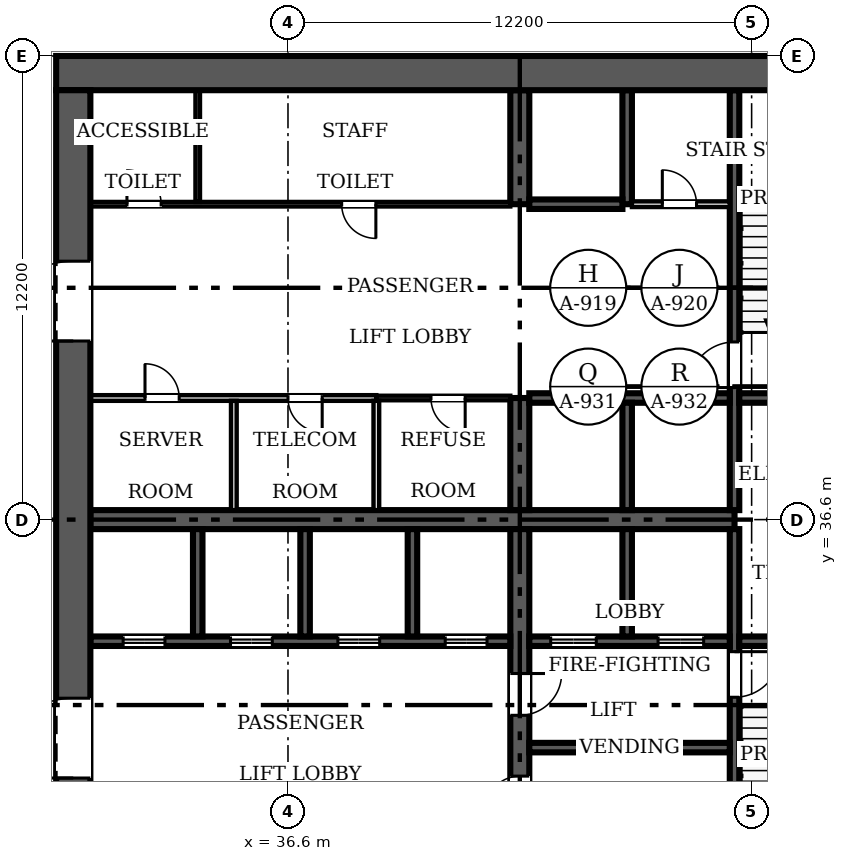
"""IFC4 building model, lengths in metres.
Left out: names, types, materials, properties, quantities, classifications, styles, units other than length and angle.
Written with IfcOpenShell. Run it as: python <this file> out.ifc"""

import sys

from ifc_helpers import new_model, si_unit, direction, frame, frame_2d, origin, place, context, subcontext, project, spatial, rectangle, extrude, source, transform, mapped, element, fill, save


model = new_model("IFC4")
c1 = context("Model", 3, precision=1e-05, world=origin(), true_north=direction((0.0, 1.0)))
c2 = subcontext(c1, "Body", "Model", "MODEL_VIEW")
j1 = project(units=[si_unit("LENGTHUNIT", "METRE"), si_unit("PLANEANGLEUNIT", "RADIAN")], contexts=[c1])
p1 = place(None, origin())
s1 = spatial("IfcSite", under=j1, at=p1, CompositionType="ELEMENT")
p2 = place(p1, origin())
s2 = spatial("IfcBuilding", under=s1, at=p2, CompositionType="ELEMENT")
p3 = place(p2, frame((0.0, 0.0, 7.2)))
s3 = spatial("IfcBuildingStorey", under=s2, at=p3, CompositionType="ELEMENT", Elevation=7.2)
p4 = place(p3, frame((30.95, 25.3, 0.0), z_axis=(0.0, 0.0, 1.0), x_axis=(0.0, 1.0, 0.0)))
e1 = element("IfcWall", 1, at=p4, inside=s3, PredefinedType="SHEAR", context=c2, shape_type="SweptSolid", body=[
    extrude(rectangle(XDim=22.6, YDim=0.9, at=frame_2d((11.3, 0.0))), origin(), (0.0, 0.0, 1.0), 4.8),
])
m1 = source(origin(), c2, "Body", "SweptSolid", [
    extrude(rectangle(XDim=2.1, YDim=2.4, at=frame_2d((1.05, 1.2))), frame((0.0, 0.46, 0.0), z_axis=(0.0, -1.0, 0.0), x_axis=(1.0, 0.0, 0.0)), (0.0, 0.0, 1.0), 0.92),
])
p5 = place(p4, frame((4.5, 0.0, 0.0)))
e2 = element("IfcOpeningElement", 2, at=p5, cuts=e1, PredefinedType="OPENING", context=c2, shape_type="MappedRepresentation", body=[
    mapped(m1, transform((0.0, 0.0, 0.0), scale=1.0)),
])
p6 = place(p4, frame((16.0, 0.0, 0.0)))
e3 = element("IfcOpeningElement", 3, at=p6, cuts=e1, PredefinedType="OPENING", context=c2, shape_type="MappedRepresentation", body=[
    mapped(m1, transform((0.0, 0.0, 0.0), scale=1.0)),
])
p7 = place(p3, frame((30.5, 48.35, 0.0), z_axis=(0.0, 0.0, 1.0), x_axis=(1.0, 0.0, 0.0)))
e4 = element("IfcWall", 4, at=p7, inside=s3, PredefinedType="SHEAR", context=c2, shape_type="SweptSolid", body=[
    extrude(rectangle(XDim=24.4, YDim=0.9, at=frame_2d((12.2, 0.0))), origin(), (0.0, 0.0, 1.0), 4.8),
])
p8 = place(p3, frame((31.4, 36.6, 0.0), z_axis=(0.0, 0.0, 1.0), x_axis=(1.0, 0.0, 0.0)))
e5 = element("IfcWall", 5, at=p8, inside=s3, PredefinedType="SHEAR", context=c2, shape_type="SweptSolid", body=[
    extrude(rectangle(XDim=16.95, YDim=0.5, at=frame_2d((8.475, 0.0))), origin(), (0.0, 0.0, 1.0), 4.8),
])
p9 = place(p3, frame((42.7, 36.35, 0.0), z_axis=(0.0, 0.0, 1.0), x_axis=(0.0, -1.0, 0.0)))
e6 = element("IfcWall", 6, at=p9, inside=s3, PredefinedType="SHEAR", context=c2, shape_type="SweptSolid", body=[
    extrude(rectangle(XDim=11.05, YDim=0.5, at=frame_2d((5.525, 0.0))), origin(), (0.0, 0.0, 1.0), 4.8),
])
m2 = source(origin(), c2, "Body", "SweptSolid", [
    extrude(rectangle(XDim=0.9, YDim=2.1, at=frame_2d((0.45, 1.05))), frame((0.0, 0.26, 0.0), z_axis=(0.0, -1.0, 0.0), x_axis=(1.0, 0.0, 0.0)), (0.0, 0.0, 1.0), 0.52),
])
p10 = place(p9, frame((6.5, 0.0, 0.0)))
e7 = element("IfcOpeningElement", 7, at=p10, cuts=e6, PredefinedType="OPENING", context=c2, shape_type="MappedRepresentation", body=[
    mapped(m2, transform((0.0, 0.0, 0.0), scale=1.0)),
])
m3 = source(origin(), c2, "Body", "SweptSolid", [
    extrude(rectangle(XDim=1.1, YDim=2.1, at=frame_2d((0.55, 1.05))), frame((0.0, 0.26, 0.0), z_axis=(0.0, -1.0, 0.0), x_axis=(1.0, 0.0, 0.0)), (0.0, 0.0, 1.0), 0.52),
])
p11 = place(p9, frame((3.8, 0.0, 0.0)))
e8 = element("IfcOpeningElement", 8, at=p11, cuts=e6, PredefinedType="OPENING", context=c2, shape_type="MappedRepresentation", body=[
    mapped(m3, transform((0.0, 0.0, 0.0), scale=1.0)),
])
p12 = place(p3, frame((42.7, 36.85, 0.0), z_axis=(0.0, 0.0, 1.0), x_axis=(0.0, 1.0, 0.0)))
e9 = element("IfcWall", 9, at=p12, inside=s3, PredefinedType="SHEAR", context=c2, shape_type="SweptSolid", body=[
    extrude(rectangle(XDim=2.95, YDim=0.5, at=frame_2d((1.475, 0.0))), origin(), (0.0, 0.0, 1.0), 4.8),
])
p13 = place(p3, frame((42.7, 44.9, 0.0), z_axis=(0.0, 0.0, 1.0), x_axis=(0.0, 1.0, 0.0)))
e10 = element("IfcWall", 10, at=p13, inside=s3, PredefinedType="SHEAR", context=c2, shape_type="SweptSolid", body=[
    extrude(rectangle(XDim=3.0, YDim=0.5, at=frame_2d((1.5, 0.0))), origin(), (0.0, 0.0, 1.0), 4.8),
])
p14 = place(p3, frame((48.35, 36.35, 0.0), z_axis=(0.0, 0.0, 1.0), x_axis=(0.0, -1.0, 0.0)))
e11 = element("IfcWall", 11, at=p14, inside=s3, PredefinedType="SOLIDWALL", context=c2, shape_type="SweptSolid", body=[
    extrude(rectangle(XDim=11.05, YDim=0.25, at=frame_2d((5.525, 0.0))), origin(), (0.0, 0.0, 1.0), 4.8),
])
m4 = source(origin(), c2, "Body", "SweptSolid", [
    extrude(rectangle(XDim=1.2, YDim=2.1, at=frame_2d((0.6, 1.05))), frame((0.0, 0.135, 0.0), z_axis=(0.0, -1.0, 0.0), x_axis=(1.0, 0.0, 0.0)), (0.0, 0.0, 1.0), 0.27),
])
p15 = place(p14, frame((3.225, 0.0, 0.0)))
e12 = element("IfcOpeningElement", 12, at=p15, cuts=e11, PredefinedType="OPENING", context=c2, shape_type="MappedRepresentation", body=[
    mapped(m4, transform((0.0, 0.0, 0.0), scale=1.0)),
])
p16 = place(p3, frame((48.35, 47.9, 0.0), z_axis=(0.0, 0.0, 1.0), x_axis=(0.0, -1.0, 0.0)))
e13 = element("IfcWall", 13, at=p16, inside=s3, PredefinedType="SOLIDWALL", context=c2, shape_type="SweptSolid", body=[
    extrude(rectangle(XDim=11.05, YDim=0.25, at=frame_2d((5.525, 0.0))), origin(), (0.0, 0.0, 1.0), 4.8),
])
p17 = place(p16, frame((6.625, 0.0, 0.0)))
e14 = element("IfcOpeningElement", 14, at=p17, cuts=e13, PredefinedType="OPENING", context=c2, shape_type="MappedRepresentation", body=[
    mapped(m4, transform((0.0, 0.0, 0.0), scale=1.0)),
])
p18 = place(p3, frame((42.45, 33.4, 0.0), z_axis=(0.0, 0.0, 1.0), x_axis=(-1.0, 0.0, 0.0)))
e15 = element("IfcWall", 15, at=p18, inside=s3, PredefinedType="SOLIDWALL", context=c2, shape_type="SweptSolid", body=[
    extrude(rectangle(XDim=11.05, YDim=0.25, at=frame_2d((5.525, 0.0))), origin(), (0.0, 0.0, 1.0), 4.8),
])
m5 = source(origin(), c2, "Body", "SweptSolid", [
    extrude(rectangle(XDim=1.1, YDim=2.1, at=frame_2d((0.55, 1.05))), frame((0.0, 0.135, 0.0), z_axis=(0.0, -1.0, 0.0), x_axis=(1.0, 0.0, 0.0)), (0.0, 0.0, 1.0), 0.27),
])
p19 = place(p18, frame((9.087, 0.0, 0.0)))
e16 = element("IfcOpeningElement", 16, at=p19, cuts=e15, PredefinedType="OPENING", context=c2, shape_type="MappedRepresentation", body=[
    mapped(m5, transform((0.0, 0.0, 0.0), scale=1.0)),
])
p20 = place(p18, frame((6.262, 0.0, 0.0)))
e17 = element("IfcOpeningElement", 17, at=p20, cuts=e15, PredefinedType="OPENING", context=c2, shape_type="MappedRepresentation", body=[
    mapped(m5, transform((0.0, 0.0, 0.0), scale=1.0)),
])
p21 = place(p18, frame((3.438, 0.0, 0.0)))
e18 = element("IfcOpeningElement", 18, at=p21, cuts=e15, PredefinedType="OPENING", context=c2, shape_type="MappedRepresentation", body=[
    mapped(m5, transform((0.0, 0.0, 0.0), scale=1.0)),
])
p22 = place(p18, frame((0.613, 0.0, 0.0)))
e19 = element("IfcOpeningElement", 19, at=p22, cuts=e15, PredefinedType="OPENING", context=c2, shape_type="MappedRepresentation", body=[
    mapped(m5, transform((0.0, 0.0, 0.0), scale=1.0)),
])
p23 = place(p3, frame((48.225, 33.4, 0.0), z_axis=(0.0, 0.0, 1.0), x_axis=(-1.0, 0.0, 0.0)))
e20 = element("IfcWall", 20, at=p23, inside=s3, PredefinedType="SOLIDWALL", context=c2, shape_type="SweptSolid", body=[
    extrude(rectangle(XDim=5.275, YDim=0.25, at=frame_2d((2.638, 0.0))), origin(), (0.0, 0.0, 1.0), 4.8),
])
p24 = place(p23, frame((3.512, 0.0, 0.0)))
e21 = element("IfcOpeningElement", 21, at=p24, cuts=e20, PredefinedType="OPENING", context=c2, shape_type="MappedRepresentation", body=[
    mapped(m4, transform((0.0, 0.0, 0.0), scale=1.0)),
])
p25 = place(p23, frame((0.688, 0.0, 0.0)))
e22 = element("IfcOpeningElement", 22, at=p25, cuts=e20, PredefinedType="OPENING", context=c2, shape_type="MappedRepresentation", body=[
    mapped(m4, transform((0.0, 0.0, 0.0), scale=1.0)),
])
p26 = place(p3, frame((48.475, 33.4, 0.0), z_axis=(0.0, 0.0, 1.0), x_axis=(1.0, 0.0, 0.0)))
e23 = element("IfcWall", 23, at=p26, inside=s3, PredefinedType="SOLIDWALL", context=c2, shape_type="SweptSolid", body=[
    extrude(rectangle(XDim=3.525, YDim=0.25, at=frame_2d((1.762, 0.0))), origin(), (0.0, 0.0, 1.0), 4.8),
])
p27 = place(p3, frame((42.95, 39.8, 0.0), z_axis=(0.0, 0.0, 1.0), x_axis=(1.0, 0.0, 0.0)))
e24 = element("IfcWall", 24, at=p27, inside=s3, PredefinedType="SOLIDWALL", context=c2, shape_type="SweptSolid", body=[
    extrude(rectangle(XDim=5.275, YDim=0.25, at=frame_2d((2.638, 0.0))), origin(), (0.0, 0.0, 1.0), 4.8),
])
p28 = place(p3, frame((48.475, 39.8, 0.0), z_axis=(0.0, 0.0, 1.0), x_axis=(1.0, 0.0, 0.0)))
e25 = element("IfcWall", 25, at=p28, inside=s3, PredefinedType="SOLIDWALL", context=c2, shape_type="SweptSolid", body=[
    extrude(rectangle(XDim=3.525, YDim=0.25, at=frame_2d((1.762, 0.0))), origin(), (0.0, 0.0, 1.0), 4.8),
])
p29 = place(p3, frame((45.525, 33.525, 0.0), z_axis=(0.0, 0.0, 1.0), x_axis=(0.0, 1.0, 0.0)))
e26 = element("IfcWall", 26, at=p29, inside=s3, PredefinedType="SOLIDWALL", context=c2, shape_type="SweptSolid", body=[
    extrude(rectangle(XDim=2.825, YDim=0.25, at=frame_2d((1.413, 0.0))), origin(), (0.0, 0.0, 1.0), 4.8),
])
p30 = place(p3, frame((45.525, 36.85, 0.0), z_axis=(0.0, 0.0, 1.0), x_axis=(0.0, 1.0, 0.0)))
e27 = element("IfcWall", 27, at=p30, inside=s3, PredefinedType="SOLIDWALL", context=c2, shape_type="SweptSolid", body=[
    extrude(rectangle(XDim=2.825, YDim=0.25, at=frame_2d((1.413, 0.0))), origin(), (0.0, 0.0, 1.0), 4.8),
])
p31 = place(p3, frame((42.95, 30.6, 0.0), z_axis=(0.0, 0.0, 1.0), x_axis=(1.0, 0.0, 0.0)))
e28 = element("IfcWall", 28, at=p31, inside=s3, PredefinedType="SOLIDWALL", context=c2, shape_type="SweptSolid", body=[
    extrude(rectangle(XDim=5.275, YDim=0.25, at=frame_2d((2.638, 0.0))), origin(), (0.0, 0.0, 1.0), 4.8),
])
for number, where, z_axis, x_axis in (
    (29, (34.225, 33.525, 0.0), (0.0, 0.0, 1.0), (0.0, 1.0, 0.0)),
    (30, (37.05, 33.525, 0.0), (0.0, 0.0, 1.0), (0.0, 1.0, 0.0)),
    (31, (39.875, 33.525, 0.0), (0.0, 0.0, 1.0), (0.0, 1.0, 0.0)),
):
    element("IfcWall", number, at=place(p3, frame(where, z_axis=z_axis, x_axis=x_axis)), inside=s3, PredefinedType="SOLIDWALL", context=c2, shape_type="SweptSolid", body=[
        extrude(rectangle(XDim=2.825, YDim=0.25, at=frame_2d((1.413, 0.0))), origin(), (0.0, 0.0, 1.0), 4.8),
    ])
p32 = place(p3, frame((45.525, 44.9, 0.0), z_axis=(0.0, 0.0, 1.0), x_axis=(0.0, 1.0, 0.0)))
e32 = element("IfcWall", 32, at=p32, inside=s3, PredefinedType="SOLIDWALL", context=c2, shape_type="SweptSolid", body=[
    extrude(rectangle(XDim=3.0, YDim=0.25, at=frame_2d((1.5, 0.0))), origin(), (0.0, 0.0, 1.0), 4.8),
])
p33 = place(p3, frame((42.95, 44.9, 0.0), z_axis=(0.0, 0.0, 1.0), x_axis=(1.0, 0.0, 0.0)))
e33 = element("IfcWall", 33, at=p33, inside=s3, PredefinedType="SOLIDWALL", context=c2, shape_type="SweptSolid", body=[
    extrude(rectangle(XDim=2.45, YDim=0.25, at=frame_2d((1.225, 0.0))), origin(), (0.0, 0.0, 1.0), 4.8),
])
p34 = place(p3, frame((31.4, 44.9, 0.0), z_axis=(0.0, 0.0, 1.0), x_axis=(1.0, 0.0, 0.0)))
e34 = element("IfcWall", 34, at=p34, inside=s3, PredefinedType="PARTITIONING", context=c2, shape_type="SweptSolid", body=[
    extrude(rectangle(XDim=11.05, YDim=0.12, at=frame_2d((5.525, 0.0))), origin(), (0.0, 0.0, 1.0), 4.55),
])
m6 = source(origin(), c2, "Body", "SweptSolid", [
    extrude(rectangle(XDim=0.9, YDim=2.1, at=frame_2d((0.45, 1.05))), frame((0.0, 0.07, 0.0), z_axis=(0.0, -1.0, 0.0), x_axis=(1.0, 0.0, 0.0)), (0.0, 0.0, 1.0), 0.14),
])
p35 = place(p34, frame((0.962, 0.0, 0.0)))
e35 = element("IfcOpeningElement", 35, at=p35, cuts=e34, PredefinedType="OPENING", context=c2, shape_type="MappedRepresentation", body=[
    mapped(m6, transform((0.0, 0.0, 0.0), scale=1.0)),
])
p36 = place(p34, frame((6.613, 0.0, 0.0)))
e36 = element("IfcOpeningElement", 36, at=p36, cuts=e34, PredefinedType="OPENING", context=c2, shape_type="MappedRepresentation", body=[
    mapped(m6, transform((0.0, 0.0, 0.0), scale=1.0)),
])
p37 = place(p3, frame((38.925, 39.8, 0.0), z_axis=(0.0, 0.0, 1.0), x_axis=(-1.0, 0.0, 0.0)))
e37 = element("IfcWall", 37, at=p37, inside=s3, PredefinedType="PARTITIONING", context=c2, shape_type="SweptSolid", body=[
    extrude(rectangle(XDim=7.525, YDim=0.15, at=frame_2d((3.763, 0.0))), origin(), (0.0, 0.0, 1.0), 4.55),
])
m7 = source(origin(), c2, "Body", "SweptSolid", [
    extrude(rectangle(XDim=0.9, YDim=2.1, at=frame_2d((0.45, 1.05))), frame((0.0, 0.085, 0.0), z_axis=(0.0, -1.0, 0.0), x_axis=(1.0, 0.0, 0.0)), (0.0, 0.0, 1.0), 0.17),
])
p38 = place(p37, frame((5.188, 0.0, 0.0)))
e38 = element("IfcOpeningElement", 38, at=p38, cuts=e37, PredefinedType="OPENING", context=c2, shape_type="MappedRepresentation", body=[
    mapped(m7, transform((0.0, 0.0, 0.0), scale=1.0)),
])
p39 = place(p37, frame((1.425, 0.0, 0.0)))
e39 = element("IfcOpeningElement", 39, at=p39, cuts=e37, PredefinedType="OPENING", context=c2, shape_type="MappedRepresentation", body=[
    mapped(m7, transform((0.0, 0.0, 0.0), scale=1.0)),
])
p40 = place(p3, frame((42.45, 39.8, 0.0), z_axis=(0.0, 0.0, 1.0), x_axis=(-1.0, 0.0, 0.0)))
e40 = element("IfcWall", 40, at=p40, inside=s3, PredefinedType="PARTITIONING", context=c2, shape_type="SweptSolid", body=[
    extrude(rectangle(XDim=3.525, YDim=0.12, at=frame_2d((1.762, 0.0))), origin(), (0.0, 0.0, 1.0), 4.55),
])
p41 = place(p40, frame((1.188, 0.0, 0.0)))
e41 = element("IfcOpeningElement", 41, at=p41, cuts=e40, PredefinedType="OPENING", context=c2, shape_type="MappedRepresentation", body=[
    mapped(m6, transform((0.0, 0.0, 0.0), scale=1.0)),
])
for number, where, z_axis, x_axis in (
    (42, (35.175, 36.85, 0.0), (0.0, 0.0, 1.0), (0.0, 1.0, 0.0)),
    (43, (38.925, 36.85, 0.0), (0.0, 0.0, 1.0), (0.0, 1.0, 0.0)),
):
    element("IfcWall", number, at=place(p3, frame(where, z_axis=z_axis, x_axis=x_axis)), inside=s3, PredefinedType="PARTITIONING", context=c2, shape_type="SweptSolid", body=[
        extrude(rectangle(XDim=2.875, YDim=0.15, at=frame_2d((1.438, 0.0))), origin(), (0.0, 0.0, 1.0), 4.55),
    ])
p42 = place(p3, frame((34.225, 44.96, 0.0), z_axis=(0.0, 0.0, 1.0), x_axis=(0.0, 1.0, 0.0)))
e44 = element("IfcWall", 44, at=p42, inside=s3, PredefinedType="PARTITIONING", context=c2, shape_type="SweptSolid", body=[
    extrude(rectangle(XDim=2.94, YDim=0.12, at=frame_2d((1.47, 0.0))), origin(), (0.0, 0.0, 1.0), 4.55),
])
p43 = place(p3, frame((45.65, 44.9, 0.0), z_axis=(0.0, 0.0, 1.0), x_axis=(1.0, 0.0, 0.0)))
e45 = element("IfcWall", 45, at=p43, inside=s3, PredefinedType="PARTITIONING", context=c2, shape_type="SweptSolid", body=[
    extrude(rectangle(XDim=2.575, YDim=0.15, at=frame_2d((1.288, 0.0))), origin(), (0.0, 0.0, 1.0), 4.55),
])
p44 = place(p43, frame((0.8, 0.0, 0.0)))
e46 = element("IfcOpeningElement", 46, at=p44, cuts=e45, PredefinedType="OPENING", context=c2, shape_type="MappedRepresentation", body=[
    mapped(m7, transform((0.0, 0.0, 0.0), scale=1.0)),
])
m8 = source(origin(), c2, "Body", "SweptSolid", [
    extrude(rectangle(XDim=2.1, YDim=2.4, at=frame_2d((1.05, 1.2))), frame((0.0, 0.025, 0.0), z_axis=(0.0, -1.0, 0.0), x_axis=(1.0, 0.0, 0.0)), (0.0, 0.0, 1.0), 0.05),
])
p45 = place(p5, origin())
e47 = element("IfcDoor", 47, at=p45, inside=s3, OperationType="DOUBLE_DOOR_SINGLE_SWING", PredefinedType="DOOR", context=c2, shape_type="MappedRepresentation", body=[
    mapped(m8, transform((0.0, 0.0, 0.0), scale=1.0)),
])
fill(e2, e47)
p46 = place(p6, origin())
e48 = element("IfcDoor", 48, at=p46, inside=s3, OperationType="DOUBLE_DOOR_SINGLE_SWING", PredefinedType="DOOR", context=c2, shape_type="MappedRepresentation", body=[
    mapped(m8, transform((0.0, 0.0, 0.0), scale=1.0)),
])
fill(e3, e48)
m9 = source(origin(), c2, "Body", "SweptSolid", [
    extrude(rectangle(XDim=0.9, YDim=2.1, at=frame_2d((0.45, 1.05))), frame((0.0, 0.025, 0.0), z_axis=(0.0, -1.0, 0.0), x_axis=(1.0, 0.0, 0.0)), (0.0, 0.0, 1.0), 0.05),
])
p47 = place(p10, origin())
e49 = element("IfcDoor", 49, at=p47, inside=s3, OperationType="SINGLE_SWING_RIGHT", PredefinedType="DOOR", context=c2, shape_type="MappedRepresentation", body=[
    mapped(m9, transform((0.0, 0.0, 0.0), scale=1.0)),
])
fill(e7, e49)
m10 = source(origin(), c2, "Body", "SweptSolid", [
    extrude(rectangle(XDim=1.1, YDim=2.1, at=frame_2d((0.55, 1.05))), frame((0.0, 0.025, 0.0), z_axis=(0.0, -1.0, 0.0), x_axis=(1.0, 0.0, 0.0)), (0.0, 0.0, 1.0), 0.05),
])
p48 = place(p11, origin())
e50 = element("IfcDoor", 50, at=p48, inside=s3, OperationType="SINGLE_SWING_LEFT", PredefinedType="DOOR", context=c2, shape_type="MappedRepresentation", body=[
    mapped(m10, transform((0.0, 0.0, 0.0), scale=1.0)),
])
fill(e8, e50)
m11 = source(origin(), c2, "Body", "SweptSolid", [
    extrude(rectangle(XDim=1.2, YDim=2.1, at=frame_2d((0.6, 1.05))), frame((0.0, 0.025, 0.0), z_axis=(0.0, -1.0, 0.0), x_axis=(1.0, 0.0, 0.0)), (0.0, 0.0, 1.0), 0.05),
])
p49 = place(p15, origin())
e51 = element("IfcDoor", 51, at=p49, inside=s3, OperationType="SINGLE_SWING_LEFT", PredefinedType="DOOR", context=c2, shape_type="MappedRepresentation", body=[
    mapped(m11, transform((0.0, 0.0, 0.0), scale=1.0)),
])
fill(e12, e51)
p50 = place(p17, origin())
e52 = element("IfcDoor", 52, at=p50, inside=s3, OperationType="SINGLE_SWING_RIGHT", PredefinedType="DOOR", context=c2, shape_type="MappedRepresentation", body=[
    mapped(m11, transform((0.0, 0.0, 0.0), scale=1.0)),
])
fill(e14, e52)
p51 = place(p19, origin())
e53 = element("IfcDoor", 53, at=p51, inside=s3, OperationType="DOUBLE_DOOR_SLIDING", PredefinedType="DOOR", context=c2, shape_type="MappedRepresentation", body=[
    mapped(m10, transform((0.0, 0.0, 0.0), scale=1.0)),
])
fill(e16, e53)
p52 = place(p20, origin())
e54 = element("IfcDoor", 54, at=p52, inside=s3, OperationType="DOUBLE_DOOR_SLIDING", PredefinedType="DOOR", context=c2, shape_type="MappedRepresentation", body=[
    mapped(m10, transform((0.0, 0.0, 0.0), scale=1.0)),
])
fill(e17, e54)
p53 = place(p21, origin())
e55 = element("IfcDoor", 55, at=p53, inside=s3, OperationType="DOUBLE_DOOR_SLIDING", PredefinedType="DOOR", context=c2, shape_type="MappedRepresentation", body=[
    mapped(m10, transform((0.0, 0.0, 0.0), scale=1.0)),
])
fill(e18, e55)
p54 = place(p22, origin())
e56 = element("IfcDoor", 56, at=p54, inside=s3, OperationType="DOUBLE_DOOR_SLIDING", PredefinedType="DOOR", context=c2, shape_type="MappedRepresentation", body=[
    mapped(m10, transform((0.0, 0.0, 0.0), scale=1.0)),
])
fill(e19, e56)
p55 = place(p24, origin())
e57 = element("IfcDoor", 57, at=p55, inside=s3, OperationType="DOUBLE_DOOR_SLIDING", PredefinedType="DOOR", context=c2, shape_type="MappedRepresentation", body=[
    mapped(m11, transform((0.0, 0.0, 0.0), scale=1.0)),
])
fill(e21, e57)
p56 = place(p25, origin())
e58 = element("IfcDoor", 58, at=p56, inside=s3, OperationType="DOUBLE_DOOR_SLIDING", PredefinedType="DOOR", context=c2, shape_type="MappedRepresentation", body=[
    mapped(m11, transform((0.0, 0.0, 0.0), scale=1.0)),
])
fill(e22, e58)
p57 = place(p35, origin())
e59 = element("IfcDoor", 59, at=p57, inside=s3, OperationType="SINGLE_SWING_LEFT", PredefinedType="DOOR", context=c2, shape_type="MappedRepresentation", body=[
    mapped(m9, transform((0.0, 0.0, 0.0), scale=1.0)),
])
fill(e35, e59)
p58 = place(p36, origin())
e60 = element("IfcDoor", 60, at=p58, inside=s3, OperationType="SINGLE_SWING_RIGHT", PredefinedType="DOOR", context=c2, shape_type="MappedRepresentation", body=[
    mapped(m9, transform((0.0, 0.0, 0.0), scale=1.0)),
])
fill(e36, e60)
p59 = place(p38, origin())
e61 = element("IfcDoor", 61, at=p59, inside=s3, OperationType="SINGLE_SWING_RIGHT", PredefinedType="DOOR", context=c2, shape_type="MappedRepresentation", body=[
    mapped(m9, transform((0.0, 0.0, 0.0), scale=1.0)),
])
fill(e38, e61)
p60 = place(p39, origin())
e62 = element("IfcDoor", 62, at=p60, inside=s3, OperationType="SINGLE_SWING_LEFT", PredefinedType="DOOR", context=c2, shape_type="MappedRepresentation", body=[
    mapped(m9, transform((0.0, 0.0, 0.0), scale=1.0)),
])
fill(e39, e62)
p61 = place(p41, origin())
e63 = element("IfcDoor", 63, at=p61, inside=s3, OperationType="SINGLE_SWING_LEFT", PredefinedType="DOOR", context=c2, shape_type="MappedRepresentation", body=[
    mapped(m9, transform((0.0, 0.0, 0.0), scale=1.0)),
])
fill(e41, e63)
p62 = place(p44, origin())
e64 = element("IfcDoor", 64, at=p62, inside=s3, OperationType="SINGLE_SWING_LEFT", PredefinedType="DOOR", context=c2, shape_type="MappedRepresentation", body=[
    mapped(m9, transform((0.0, 0.0, 0.0), scale=1.0)),
])
fill(e46, e64)
save(model, sys.argv[1])
